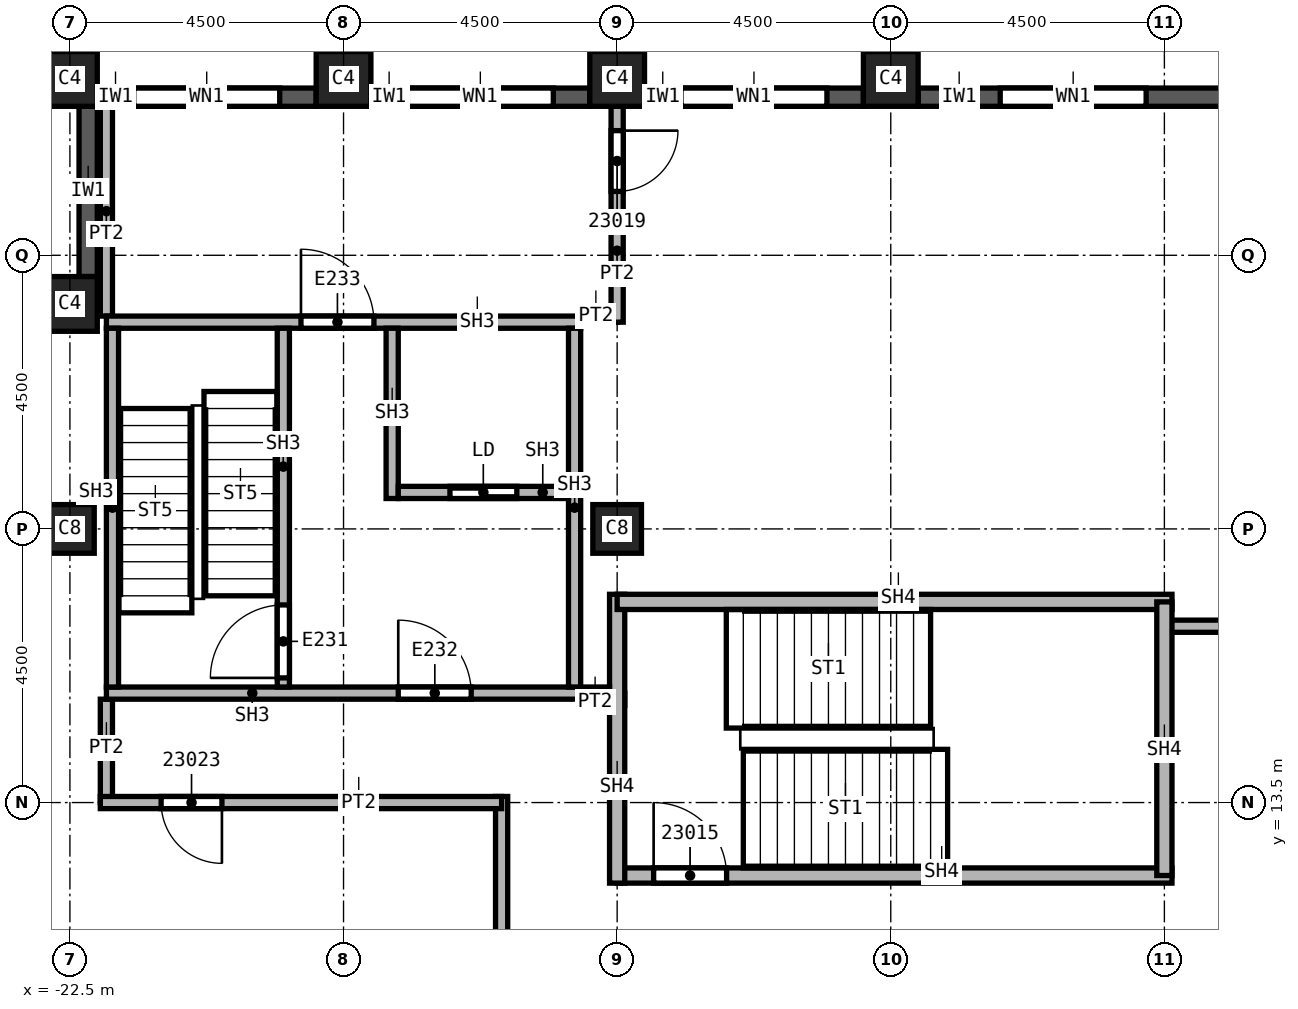
"""IFC4 building model, lengths in metres.
Left out: names, types, materials, properties, quantities, classifications, styles, units other than length and angle.
Written with IfcOpenShell. Run it as: python <this file> out.ifc"""

import sys

from ifc_helpers import new_model, si_unit, direction, frame, frame_2d, origin, origin_2d, place, context, subcontext, project, spatial, rectangle, extrude, element, fill, save


model = new_model("IFC4")
c1 = context("Model", 3, precision=1e-05, world=origin(), true_north=direction((0.0, 1.0)))
c2 = subcontext(c1, "Body", "Model", "MODEL_VIEW")
j1 = project(units=[si_unit("LENGTHUNIT", "METRE"), si_unit("PLANEANGLEUNIT", "RADIAN")], contexts=[c1])
p1 = place(None, origin())
s1 = spatial("IfcSite", under=j1, at=p1, CompositionType="ELEMENT")
p2 = place(p1, origin())
s2 = spatial("IfcBuilding", under=s1, at=p2, CompositionType="ELEMENT")
p3 = place(p2, frame((0.0, 0.0, 326.0)))
s3 = spatial("IfcBuildingStorey", under=s2, at=p3, CompositionType="ELEMENT", Elevation=326.0)
for number, where, z_axis, x_axis in (
    (1, (-13.5, 18.0, 0.0), (0.0, 0.0, 1.0), (1.0, 0.0, 0.0)),
    (2, (-22.5, 18.0, 0.0), (0.0, 0.0, 1.0), (1.0, 0.0, 0.0)),
):
    element("IfcColumn", number, at=place(p3, frame(where, z_axis=z_axis, x_axis=x_axis)), inside=s3, PredefinedType="COLUMN", context=c2, shape_type="SweptSolid", body=[
        extrude(rectangle(XDim=0.8, YDim=0.8, at=origin_2d()), origin(), (0.0, 0.0, 1.0), 3.74),
    ])
for number, where, z_axis, x_axis in (
    (3, (-9.0, 25.4, 0.0), (0.0, 0.0, 1.0), (1.0, 0.0, 0.0)),
    (4, (-13.5, 25.4, 0.0), (0.0, 0.0, 1.0), (1.0, 0.0, 0.0)),
    (5, (-18.0, 25.4, 0.0), (0.0, 0.0, 1.0), (1.0, 0.0, 0.0)),
    (6, (-22.5, 25.4, 0.0), (0.0, 0.0, 1.0), (1.0, 0.0, 0.0)),
    (7, (-22.5, 21.7, 0.0), (0.0, 0.0, 1.0), (1.0, 0.0, 0.0)),
):
    element("IfcColumn", number, at=place(p3, frame(where, z_axis=z_axis, x_axis=x_axis)), inside=s3, PredefinedType="COLUMN", context=c2, shape_type="SweptSolid", body=[
        extrude(rectangle(XDim=0.9, YDim=0.9, at=origin_2d()), origin(), (0.0, 0.0, 1.0), 3.74),
    ])
p4 = place(p3, frame((-3.45, 25.1, 0.0), z_axis=(0.0, 0.0, 1.0), x_axis=(-1.0, 0.0, 0.0)))
e8 = element("IfcWall", 8, at=p4, inside=s3, PredefinedType="SOLIDWALL", context=c2, shape_type="SweptSolid", body=[
    extrude(rectangle(XDim=5.1, YDim=0.3, at=frame_2d((2.55, 0.0))), origin(), (0.0, 0.0, 1.0), 3.14),
])
p5 = place(p4, frame((1.35, 0.0, 0.8)))
e9 = element("IfcOpeningElement", 9, at=p5, cuts=e8, PredefinedType="OPENING", context=c2, shape_type="SweptSolid", body=[
    extrude(rectangle(XDim=2.4, YDim=1.95, at=frame_2d((1.2, 0.975))), frame((0.0, 0.15, 0.0), z_axis=(0.0, -1.0, 0.0), x_axis=(1.0, 0.0, 0.0)), (0.0, 0.0, 1.0), 0.3),
])
p6 = place(p3, frame((-9.45, 25.1, 0.0), z_axis=(0.0, 0.0, 1.0), x_axis=(-1.0, 0.0, 0.0)))
e10 = element("IfcWall", 10, at=p6, inside=s3, PredefinedType="SOLIDWALL", context=c2, shape_type="SweptSolid", body=[
    extrude(rectangle(XDim=3.6, YDim=0.3, at=frame_2d((1.8, 0.0))), origin(), (0.0, 0.0, 1.0), 3.14),
])
p7 = place(p6, frame((0.6, 0.0, 0.8)))
e11 = element("IfcOpeningElement", 11, at=p7, cuts=e10, PredefinedType="OPENING", context=c2, shape_type="SweptSolid", body=[
    extrude(rectangle(XDim=2.4, YDim=1.95, at=frame_2d((1.2, 0.975))), frame((0.0, 0.15, 0.0), z_axis=(0.0, -1.0, 0.0), x_axis=(1.0, 0.0, 0.0)), (0.0, 0.0, 1.0), 0.3),
])
p8 = place(p3, frame((-13.95, 25.1, 0.0), z_axis=(0.0, 0.0, 1.0), x_axis=(-1.0, 0.0, 0.0)))
e12 = element("IfcWall", 12, at=p8, inside=s3, PredefinedType="SOLIDWALL", context=c2, shape_type="SweptSolid", body=[
    extrude(rectangle(XDim=3.6, YDim=0.3, at=frame_2d((1.8, 0.0))), origin(), (0.0, 0.0, 1.0), 3.14),
])
p9 = place(p8, frame((0.6, 0.0, 0.8)))
e13 = element("IfcOpeningElement", 13, at=p9, cuts=e12, PredefinedType="OPENING", context=c2, shape_type="SweptSolid", body=[
    extrude(rectangle(XDim=2.4, YDim=1.95, at=frame_2d((1.2, 0.975))), frame((0.0, 0.15, 0.0), z_axis=(0.0, -1.0, 0.0), x_axis=(1.0, 0.0, 0.0)), (0.0, 0.0, 1.0), 0.3),
])
p10 = place(p3, frame((-18.45, 25.1, 0.0), z_axis=(0.0, 0.0, 1.0), x_axis=(-1.0, 0.0, 0.0)))
e14 = element("IfcWall", 14, at=p10, inside=s3, PredefinedType="SOLIDWALL", context=c2, shape_type="SweptSolid", body=[
    extrude(rectangle(XDim=3.6, YDim=0.3, at=frame_2d((1.8, 0.0))), origin(), (0.0, 0.0, 1.0), 3.14),
])
p11 = place(p10, frame((0.6, 0.0, 0.8)))
e15 = element("IfcOpeningElement", 15, at=p11, cuts=e14, PredefinedType="OPENING", context=c2, shape_type="SweptSolid", body=[
    extrude(rectangle(XDim=2.4, YDim=1.95, at=frame_2d((1.2, 0.975))), frame((0.0, 0.15, 0.0), z_axis=(0.0, -1.0, 0.0), x_axis=(1.0, 0.0, 0.0)), (0.0, 0.0, 1.0), 0.3),
])
p12 = place(p3, frame((-22.2, 24.95, 0.0), z_axis=(0.0, 0.0, 1.0), x_axis=(0.0, -1.0, 0.0)))
e16 = element("IfcWall", 16, at=p12, inside=s3, PredefinedType="SOLIDWALL", context=c2, shape_type="SweptSolid", body=[
    extrude(rectangle(XDim=2.8, YDim=0.3, at=frame_2d((1.4, 0.0))), origin(), (0.0, 0.0, 1.0), 3.14),
])
p13 = place(p3, frame((-21.9, 13.5, 0.0), z_axis=(0.0, 0.0, 1.0), x_axis=(0.0, 1.0, 0.0)))
e17 = element("IfcWall", 17, at=p13, inside=s3, PredefinedType="PARTITIONING", context=c2, shape_type="SweptSolid", body=[
    extrude(rectangle(XDim=1.7, YDim=0.2, at=frame_2d((0.85, 0.0))), origin(), (0.0, 0.0, 1.0), 3.74),
])
p14 = place(p3, frame((-21.9, 21.5, 0.0), z_axis=(0.0, 0.0, 1.0), x_axis=(0.0, 1.0, 0.0)))
e18 = element("IfcWall", 18, at=p14, inside=s3, PredefinedType="PARTITIONING", context=c2, shape_type="SweptSolid", body=[
    extrude(rectangle(XDim=3.45, YDim=0.2, at=frame_2d((1.725, 0.0))), origin(), (0.0, 0.0, 1.0), 3.74),
])
p15 = place(p3, frame((-15.4, -24.95, 0.0), z_axis=(0.0, 0.0, 1.0), x_axis=(0.0, 1.0, 0.0)))
e19 = element("IfcWall", 19, at=p15, inside=s3, PredefinedType="PARTITIONING", context=c2, shape_type="SweptSolid", body=[
    extrude(rectangle(XDim=38.55, YDim=0.2, at=frame_2d((19.275, 0.0))), origin(), (0.0, 0.0, 1.0), 3.74),
])
p16 = place(p15, frame((31.7, 0.0, 0.0)))
e20 = element("IfcOpeningElement", 20, at=p16, cuts=e19, PredefinedType="OPENING", context=c2, shape_type="SweptSolid", body=[
    extrude(rectangle(XDim=1.0, YDim=2.1, at=frame_2d((0.5, 1.05))), frame((0.0, 0.1, 0.0), z_axis=(0.0, -1.0, 0.0), x_axis=(1.0, 0.0, 0.0)), (0.0, 0.0, 1.0), 0.2),
])
p17 = place(p15, frame((4.0, 0.0, 0.0)))
e21 = element("IfcOpeningElement", 21, at=p17, cuts=e19, PredefinedType="OPENING", context=c2, shape_type="SweptSolid", body=[
    extrude(rectangle(XDim=1.0, YDim=2.1, at=frame_2d((0.5, 1.05))), frame((0.0, 0.1, 0.0), z_axis=(0.0, -1.0, 0.0), x_axis=(1.0, 0.0, 0.0)), (0.0, 0.0, 1.0), 0.2),
])
p18 = place(p15, frame((11.0, 0.0, 0.0)))
e22 = element("IfcOpeningElement", 22, at=p18, cuts=e19, PredefinedType="OPENING", context=c2, shape_type="SweptSolid", body=[
    extrude(rectangle(XDim=1.0, YDim=2.1, at=frame_2d((0.5, 1.05))), frame((0.0, 0.1, 0.0), z_axis=(0.0, -1.0, 0.0), x_axis=(1.0, 0.0, 0.0)), (0.0, 0.0, 1.0), 0.2),
])
p19 = place(p15, frame((19.1, 0.0, 0.0)))
e23 = element("IfcOpeningElement", 23, at=p19, cuts=e19, PredefinedType="OPENING", context=c2, shape_type="SweptSolid", body=[
    extrude(rectangle(XDim=1.0, YDim=2.1, at=frame_2d((0.5, 1.05))), frame((0.0, 0.1, 0.0), z_axis=(0.0, -1.0, 0.0), x_axis=(1.0, 0.0, 0.0)), (0.0, 0.0, 1.0), 0.2),
])
p20 = place(p3, frame((-15.4, 13.5, 0.0), z_axis=(0.0, 0.0, 1.0), x_axis=(-1.0, 0.0, 0.0)))
e24 = element("IfcWall", 24, at=p20, inside=s3, PredefinedType="PARTITIONING", context=c2, shape_type="SweptSolid", body=[
    extrude(rectangle(XDim=6.6, YDim=0.2, at=frame_2d((3.3, 0.0))), origin(), (0.0, 0.0, 1.0), 3.74),
])
p21 = place(p20, frame((4.6, 0.0, 0.0)))
e25 = element("IfcOpeningElement", 25, at=p21, cuts=e24, PredefinedType="OPENING", context=c2, shape_type="SweptSolid", body=[
    extrude(rectangle(XDim=1.0, YDim=2.1, at=frame_2d((0.5, 1.05))), frame((0.0, 0.1, 0.0), z_axis=(0.0, -1.0, 0.0), x_axis=(1.0, 0.0, 0.0)), (0.0, 0.0, 1.0), 0.2),
])
p22 = place(p3, frame((-14.1, 15.2, 0.0), z_axis=(0.0, 0.0, 1.0), x_axis=(1.0, 0.0, 0.0)))
e26 = element("IfcWall", 26, at=p22, inside=s3, PredefinedType="PARTITIONING", context=c2, shape_type="SweptSolid", body=[
    extrude(rectangle(XDim=0.725, YDim=0.2, at=frame_2d((0.363, 0.0))), origin(), (0.0, 0.0, 1.0), 3.74),
])
p23 = place(p3, frame((-13.5, 21.5, 0.0), z_axis=(0.0, 0.0, 1.0), x_axis=(-1.0, 0.0, 0.0)))
e27 = element("IfcWall", 27, at=p23, inside=s3, PredefinedType="PARTITIONING", context=c2, shape_type="SweptSolid", body=[
    extrude(rectangle(XDim=0.6, YDim=0.2, at=frame_2d((0.3, 0.0))), origin(), (0.0, 0.0, 1.0), 3.74),
])
p24 = place(p3, frame((-13.5, 24.95, 0.0), z_axis=(0.0, 0.0, 1.0), x_axis=(0.0, -1.0, 0.0)))
e28 = element("IfcWall", 28, at=p24, inside=s3, PredefinedType="PARTITIONING", context=c2, shape_type="SweptSolid", body=[
    extrude(rectangle(XDim=3.55, YDim=0.2, at=frame_2d((1.775, 0.0))), origin(), (0.0, 0.0, 1.0), 3.74),
])
p25 = place(p24, frame((0.4, 0.0, 0.0)))
e29 = element("IfcOpeningElement", 29, at=p25, cuts=e28, PredefinedType="OPENING", context=c2, shape_type="SweptSolid", body=[
    extrude(rectangle(XDim=1.0, YDim=2.1, at=frame_2d((0.5, 1.05))), frame((0.0, 0.1, 0.0), z_axis=(0.0, -1.0, 0.0), x_axis=(1.0, 0.0, 0.0)), (0.0, 0.0, 1.0), 0.2),
])
p26 = place(p3, frame((-4.5, 16.4, 0.0), z_axis=(0.0, 0.0, 1.0), x_axis=(1.0, 0.0, 0.0)))
e30 = element("IfcWall", 30, at=p26, inside=s3, PredefinedType="PARTITIONING", context=c2, shape_type="SweptSolid", body=[
    extrude(rectangle(XDim=3.6, YDim=0.2, at=frame_2d((1.8, 0.0))), origin(), (0.0, 0.0, 1.0), 3.204),
])
p27 = place(p3, frame((-13.5, 12.3, 0.0), z_axis=(0.0, 0.0, 1.0), x_axis=(1.0, 0.0, 0.0)))
e31 = element("IfcWall", 31, at=p27, inside=s3, PredefinedType="SOLIDWALL", context=c2, shape_type="SweptSolid", body=[
    extrude(rectangle(XDim=9.125, YDim=0.25, at=frame_2d((4.562, 0.0))), origin(), (0.0, 0.0, 1.0), 3.74),
])
p28 = place(p27, frame((0.6, 0.0, 0.0)))
e32 = element("IfcOpeningElement", 32, at=p28, cuts=e31, PredefinedType="OPENING", context=c2, shape_type="SweptSolid", body=[
    extrude(rectangle(XDim=1.2, YDim=2.1, at=frame_2d((0.6, 1.05))), frame((0.0, 0.125, 0.0), z_axis=(0.0, -1.0, 0.0), x_axis=(1.0, 0.0, 0.0)), (0.0, 0.0, 1.0), 0.25),
])
p29 = place(p3, frame((-13.5, 12.175, 0.0), z_axis=(0.0, 0.0, 1.0), x_axis=(0.0, 1.0, 0.0)))
e33 = element("IfcWall", 33, at=p29, inside=s3, PredefinedType="SOLIDWALL", context=c2, shape_type="SweptSolid", body=[
    extrude(rectangle(XDim=4.75, YDim=0.25, at=frame_2d((2.375, 0.0))), origin(), (0.0, 0.0, 1.0), 3.74),
])
p30 = place(p3, frame((-13.5, 16.8, 0.0), z_axis=(0.0, 0.0, 1.0), x_axis=(1.0, 0.0, 0.0)))
e34 = element("IfcWall", 34, at=p30, inside=s3, PredefinedType="SOLIDWALL", context=c2, shape_type="SweptSolid", body=[
    extrude(rectangle(XDim=9.125, YDim=0.25, at=frame_2d((4.562, 0.0))), origin(), (0.0, 0.0, 1.0), 3.74),
])
p31 = place(p3, frame((-4.5, 16.8, 0.0), z_axis=(0.0, 0.0, 1.0), x_axis=(0.0, -1.0, 0.0)))
e35 = element("IfcWall", 35, at=p31, inside=s3, PredefinedType="SOLIDWALL", context=c2, shape_type="SweptSolid", body=[
    extrude(rectangle(XDim=4.5, YDim=0.25, at=frame_2d((2.25, 0.0))), origin(), (0.0, 0.0, 1.0), 3.74),
])
p32 = place(p3, frame((-21.9, 15.3, 0.0), z_axis=(0.0, 0.0, 1.0), x_axis=(1.0, 0.0, 0.0)))
e36 = element("IfcWall", 36, at=p32, inside=s3, PredefinedType="SOLIDWALL", context=c2, shape_type="SweptSolid", body=[
    extrude(rectangle(XDim=8.275, YDim=0.2, at=frame_2d((4.137, 0.0))), origin(), (0.0, 0.0, 1.0), 3.74),
])
p33 = place(p32, frame((4.8, 0.0, 0.0)))
e37 = element("IfcOpeningElement", 37, at=p33, cuts=e36, PredefinedType="OPENING", context=c2, shape_type="SweptSolid", body=[
    extrude(rectangle(XDim=1.2, YDim=2.1, at=frame_2d((0.6, 1.05))), frame((0.0, 0.1, 0.0), z_axis=(0.0, -1.0, 0.0), x_axis=(1.0, 0.0, 0.0)), (0.0, 0.0, 1.0), 0.2),
])
p34 = place(p3, frame((-21.9, 21.4, 0.0), z_axis=(0.0, 0.0, 1.0), x_axis=(1.0, 0.0, 0.0)))
e38 = element("IfcWall", 38, at=p34, inside=s3, PredefinedType="SOLIDWALL", context=c2, shape_type="SweptSolid", body=[
    extrude(rectangle(XDim=7.8, YDim=0.2, at=frame_2d((3.9, 0.0))), origin(), (0.0, 0.0, 1.0), 3.74),
])
p35 = place(p34, frame((3.2, 0.0, 0.0)))
e39 = element("IfcOpeningElement", 39, at=p35, cuts=e38, PredefinedType="OPENING", context=c2, shape_type="SweptSolid", body=[
    extrude(rectangle(XDim=1.2, YDim=2.1, at=frame_2d((0.6, 1.05))), frame((0.0, 0.1, 0.0), z_axis=(0.0, -1.0, 0.0), x_axis=(1.0, 0.0, 0.0)), (0.0, 0.0, 1.0), 0.2),
])
for number, where, z_axis, x_axis in (
    (40, (-21.8, 15.4, 0.0), (0.0, 0.0, 1.0), (0.0, 1.0, 0.0)),
    (41, (-14.2, 15.4, 0.0), (0.0, 0.0, 1.0), (0.0, 1.0, 0.0)),
):
    element("IfcWall", number, at=place(p3, frame(where, z_axis=z_axis, x_axis=x_axis)), inside=s3, PredefinedType="SOLIDWALL", context=c2, shape_type="SweptSolid", body=[
        extrude(rectangle(XDim=5.9, YDim=0.2, at=frame_2d((2.95, 0.0))), origin(), (0.0, 0.0, 1.0), 3.74),
    ])
p36 = place(p3, frame((-18.99, 15.4, 0.0), z_axis=(0.0, 0.0, 1.0), x_axis=(0.0, 1.0, 0.0)))
e42 = element("IfcWall", 42, at=p36, inside=s3, PredefinedType="SOLIDWALL", context=c2, shape_type="SweptSolid", body=[
    extrude(rectangle(XDim=5.9, YDim=0.2, at=frame_2d((2.95, 0.0))), origin(), (0.0, 0.0, 1.0), 3.74),
])
p37 = place(p36, frame((0.15, 0.0, 0.0)))
e43 = element("IfcOpeningElement", 43, at=p37, cuts=e42, PredefinedType="OPENING", context=c2, shape_type="SweptSolid", body=[
    extrude(rectangle(XDim=1.2, YDim=2.1, at=frame_2d((0.6, 1.05))), frame((0.0, 0.1, 0.0), z_axis=(0.0, -1.0, 0.0), x_axis=(1.0, 0.0, 0.0)), (0.0, 0.0, 1.0), 0.2),
])
p38 = place(p3, frame((-17.2, 18.5, 0.0), z_axis=(0.0, 0.0, 1.0), x_axis=(0.0, 1.0, 0.0)))
e44 = element("IfcWall", 44, at=p38, inside=s3, PredefinedType="SOLIDWALL", context=c2, shape_type="SweptSolid", body=[
    extrude(rectangle(XDim=2.8, YDim=0.2, at=frame_2d((1.4, 0.0))), origin(), (0.0, 0.0, 1.0), 3.74),
])
p39 = place(p3, frame((-17.1, 18.6, 0.0), z_axis=(0.0, 0.0, 1.0), x_axis=(1.0, 0.0, 0.0)))
e45 = element("IfcWall", 45, at=p39, inside=s3, PredefinedType="SOLIDWALL", context=c2, shape_type="SweptSolid", body=[
    extrude(rectangle(XDim=2.8, YDim=0.2, at=frame_2d((1.4, 0.0))), origin(), (0.0, 0.0, 1.0), 3.74),
])
p40 = place(p39, frame((0.85, 0.0, 0.0)))
e46 = element("IfcOpeningElement", 46, at=p40, cuts=e45, PredefinedType="OPENING", context=c2, shape_type="SweptSolid", body=[
    extrude(rectangle(XDim=1.1, YDim=2.1, at=frame_2d((0.55, 1.05))), frame((0.0, 0.1, 0.0), z_axis=(0.0, -1.0, 0.0), x_axis=(1.0, 0.0, 0.0)), (0.0, 0.0, 1.0), 0.2),
])
p41 = place(p5, origin())
e47 = element("IfcWindow", 47, at=p41, inside=s3, PartitioningType="SINGLE_PANEL", PredefinedType="WINDOW", context=c2, shape_type="SweptSolid", body=[
    extrude(rectangle(XDim=2.4, YDim=1.95, at=frame_2d((1.2, 0.975))), frame((0.0, 0.03, 0.0), z_axis=(0.0, -1.0, 0.0), x_axis=(1.0, 0.0, 0.0)), (0.0, 0.0, 1.0), 0.06),
])
fill(e9, e47)
p42 = place(p7, origin())
e48 = element("IfcWindow", 48, at=p42, inside=s3, PartitioningType="SINGLE_PANEL", PredefinedType="WINDOW", context=c2, shape_type="SweptSolid", body=[
    extrude(rectangle(XDim=2.4, YDim=1.95, at=frame_2d((1.2, 0.975))), frame((0.0, 0.03, 0.0), z_axis=(0.0, -1.0, 0.0), x_axis=(1.0, 0.0, 0.0)), (0.0, 0.0, 1.0), 0.06),
])
fill(e11, e48)
p43 = place(p9, origin())
e49 = element("IfcWindow", 49, at=p43, inside=s3, PartitioningType="SINGLE_PANEL", PredefinedType="WINDOW", context=c2, shape_type="SweptSolid", body=[
    extrude(rectangle(XDim=2.4, YDim=1.95, at=frame_2d((1.2, 0.975))), frame((0.0, 0.03, 0.0), z_axis=(0.0, -1.0, 0.0), x_axis=(1.0, 0.0, 0.0)), (0.0, 0.0, 1.0), 0.06),
])
fill(e13, e49)
p44 = place(p11, origin())
e50 = element("IfcWindow", 50, at=p44, inside=s3, PartitioningType="SINGLE_PANEL", PredefinedType="WINDOW", context=c2, shape_type="SweptSolid", body=[
    extrude(rectangle(XDim=2.4, YDim=1.95, at=frame_2d((1.2, 0.975))), frame((0.0, 0.03, 0.0), z_axis=(0.0, -1.0, 0.0), x_axis=(1.0, 0.0, 0.0)), (0.0, 0.0, 1.0), 0.06),
])
fill(e15, e50)
p45 = place(p28, origin())
e51 = element("IfcDoor", 51, at=p45, inside=s3, OperationType="SINGLE_SWING_RIGHT", PredefinedType="DOOR", context=c2, shape_type="SweptSolid", body=[
    extrude(rectangle(XDim=1.2, YDim=2.1, at=frame_2d((0.6, 1.05))), frame((0.0, 0.025, 0.0), z_axis=(0.0, -1.0, 0.0), x_axis=(1.0, 0.0, 0.0)), (0.0, 0.0, 1.0), 0.05),
])
fill(e32, e51)
p46 = place(p25, origin())
e52 = element("IfcDoor", 52, at=p46, inside=s3, OperationType="SINGLE_SWING_RIGHT", PredefinedType="DOOR", context=c2, shape_type="SweptSolid", body=[
    extrude(rectangle(XDim=1.0, YDim=2.1, at=frame_2d((0.5, 1.05))), frame((0.0, 0.025, 0.0), z_axis=(0.0, -1.0, 0.0), x_axis=(1.0, 0.0, 0.0)), (0.0, 0.0, 1.0), 0.05),
])
fill(e29, e52)
p47 = place(p21, origin())
e53 = element("IfcDoor", 53, at=p47, inside=s3, OperationType="SINGLE_SWING_RIGHT", PredefinedType="DOOR", context=c2, shape_type="SweptSolid", body=[
    extrude(rectangle(XDim=1.0, YDim=2.1, at=frame_2d((0.5, 1.05))), frame((0.0, 0.025, 0.0), z_axis=(0.0, -1.0, 0.0), x_axis=(1.0, 0.0, 0.0)), (0.0, 0.0, 1.0), 0.05),
])
fill(e25, e53)
p48 = place(p37, origin())
e54 = element("IfcDoor", 54, at=p48, inside=s3, OperationType="SINGLE_SWING_LEFT", PredefinedType="DOOR", context=c2, shape_type="SweptSolid", body=[
    extrude(rectangle(XDim=1.2, YDim=2.1, at=frame_2d((0.6, 1.05))), frame((0.0, 0.025, 0.0), z_axis=(0.0, -1.0, 0.0), x_axis=(1.0, 0.0, 0.0)), (0.0, 0.0, 1.0), 0.05),
])
fill(e43, e54)
p49 = place(p40, origin())
e55 = element("IfcDoor", 55, at=p49, inside=s3, OperationType="SLIDING_TO_LEFT", PredefinedType="DOOR", context=c2, shape_type="SweptSolid", body=[
    extrude(rectangle(XDim=1.1, YDim=2.1, at=frame_2d((0.55, 1.05))), frame((0.0, 0.025, 0.0), z_axis=(0.0, -1.0, 0.0), x_axis=(1.0, 0.0, 0.0)), (0.0, 0.0, 1.0), 0.05),
])
fill(e46, e55)
p50 = place(p33, origin())
e56 = element("IfcDoor", 56, at=p50, inside=s3, OperationType="SINGLE_SWING_RIGHT", PredefinedType="DOOR", context=c2, shape_type="SweptSolid", body=[
    extrude(rectangle(XDim=1.2, YDim=2.1, at=frame_2d((0.6, 1.05))), frame((0.0, 0.025, 0.0), z_axis=(0.0, -1.0, 0.0), x_axis=(1.0, 0.0, 0.0)), (0.0, 0.0, 1.0), 0.05),
])
fill(e37, e56)
p51 = place(p35, origin())
e57 = element("IfcDoor", 57, at=p51, inside=s3, OperationType="SINGLE_SWING_LEFT", PredefinedType="DOOR", context=c2, shape_type="SweptSolid", body=[
    extrude(rectangle(XDim=1.2, YDim=2.1, at=frame_2d((0.6, 1.05))), frame((0.0, 0.025, 0.0), z_axis=(0.0, -1.0, 0.0), x_axis=(1.0, 0.0, 0.0)), (0.0, 0.0, 1.0), 0.05),
])
fill(e39, e57)
save(model, sys.argv[1])
